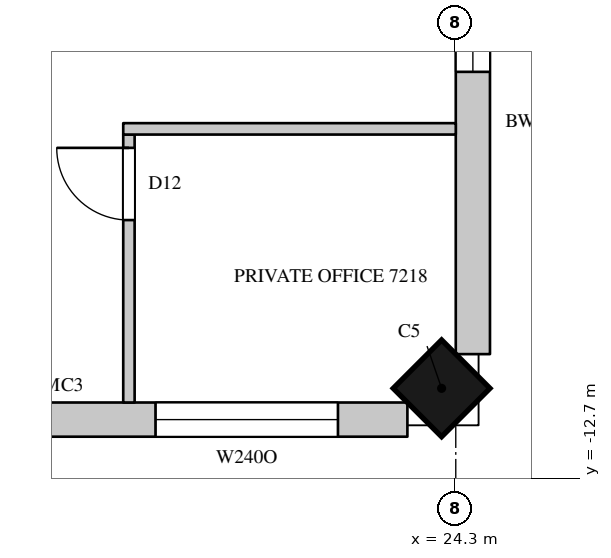
"""IFC4 building model, lengths in metres.
Left out: names, types, materials, properties, quantities, classifications, styles, units other than length and angle.
Written with IfcOpenShell. Run it as: python <this file> out.ifc"""

import sys

from ifc_helpers import new_model, si_unit, direction, frame, frame_2d, origin, origin_2d, place, context, subcontext, project, spatial, rectangle, extrude, element, fill, save


model = new_model("IFC4")
c1 = context("Model", 3, precision=1e-05, world=origin(), true_north=direction((0.0, 1.0)))
c2 = subcontext(c1, "Body", "Model", "MODEL_VIEW")
j1 = project(units=[si_unit("LENGTHUNIT", "METRE"), si_unit("PLANEANGLEUNIT", "RADIAN")], contexts=[c1])
p1 = place(None, origin())
s1 = spatial("IfcSite", under=j1, at=p1, CompositionType="ELEMENT")
p2 = place(p1, origin())
s2 = spatial("IfcBuilding", under=s1, at=p2, CompositionType="ELEMENT")
p3 = place(p2, frame((0.0, 0.0, 317.2)))
s3 = spatial("IfcBuildingStorey", under=s2, at=p3, CompositionType="ELEMENT", Elevation=317.2)
p4 = place(p3, frame((24.114, -11.514, 0.0), z_axis=(0.0, 0.0, 1.0), x_axis=(0.707106781187, 0.707106781187, 0.0)))
e1 = element("IfcColumn", 1, at=p4, inside=s3, PredefinedType="COLUMN", context=c2, shape_type="SweptSolid", body=[
    extrude(rectangle(XDim=0.9, YDim=0.9, at=origin_2d()), origin(), (0.0, 0.0, 1.0), 4.1),
])
p5 = place(p3, frame((18.648, -11.925, 0.0), z_axis=(0.0, 0.0, 1.0), x_axis=(1.0, 0.0, 0.0)))
e2 = element("IfcWall", 2, at=p5, inside=s3, PredefinedType="SOLIDWALL", context=c2, shape_type="SweptSolid", body=[
    extrude(rectangle(XDim=5.015, YDim=0.45, at=frame_2d((2.508, 0.0))), origin(), (0.0, 0.0, 1.0), 3.8),
])
p6 = place(p5, frame((1.702, 0.0, 1.05)))
e3 = element("IfcOpeningElement", 3, at=p6, cuts=e2, PredefinedType="OPENING", context=c2, shape_type="SweptSolid", body=[
    extrude(rectangle(XDim=2.4, YDim=2.4, at=frame_2d((1.2, 1.2))), frame((0.0, 0.235, 0.0), z_axis=(0.0, -1.0, 0.0), x_axis=(1.0, 0.0, 0.0)), (0.0, 0.0, 1.0), 0.47),
])
p7 = place(p3, frame((24.525, -11.064, 0.0), z_axis=(0.0, 0.0, 1.0), x_axis=(0.0, 1.0, 0.0)))
e4 = element("IfcWall", 4, at=p7, inside=s3, PredefinedType="SOLIDWALL", context=c2, shape_type="SweptSolid", body=[
    extrude(rectangle(XDim=6.114, YDim=0.45, at=frame_2d((3.057, 0.0))), origin(), (0.0, 0.0, 1.0), 3.8),
])
p8 = place(p7, frame((3.714, 0.0, 1.05)))
e5 = element("IfcOpeningElement", 5, at=p8, cuts=e4, PredefinedType="OPENING", context=c2, shape_type="SweptSolid", body=[
    extrude(rectangle(XDim=2.1, YDim=2.4, at=frame_2d((1.05, 1.2))), frame((0.0, 0.235, 0.0), z_axis=(0.0, -1.0, 0.0), x_axis=(1.0, 0.0, 0.0)), (0.0, 0.0, 1.0), 0.47),
])
p9 = place(p3, frame((20.0, -11.7, 0.0), z_axis=(0.0, 0.0, 1.0), x_axis=(0.0, 1.0, 0.0)))
e6 = element("IfcWall", 6, at=p9, inside=s3, PredefinedType="PARTITIONING", context=c2, shape_type="SweptSolid", body=[
    extrude(rectangle(XDim=3.525, YDim=0.15, at=frame_2d((1.762, 0.0))), origin(), (0.0, 0.0, 1.0), 3.8),
])
p10 = place(p9, frame((2.4, 0.0, 0.0)))
e7 = element("IfcOpeningElement", 7, at=p10, cuts=e6, PredefinedType="OPENING", context=c2, shape_type="SweptSolid", body=[
    extrude(rectangle(XDim=0.95, YDim=2.2, at=frame_2d((0.475, 1.1))), frame((0.0, 0.085, 0.0), z_axis=(0.0, -1.0, 0.0), x_axis=(1.0, 0.0, 0.0)), (0.0, 0.0, 1.0), 0.17),
])
p11 = place(p3, frame((19.925, -8.1, 0.0), z_axis=(0.0, 0.0, 1.0), x_axis=(1.0, 0.0, 0.0)))
e8 = element("IfcWall", 8, at=p11, inside=s3, PredefinedType="PARTITIONING", context=c2, shape_type="SweptSolid", body=[
    extrude(rectangle(XDim=4.375, YDim=0.15, at=frame_2d((2.188, 0.0))), origin(), (0.0, 0.0, 1.0), 3.15),
])
p12 = place(p8, origin())
e9 = element("IfcWindow", 9, at=p12, inside=s3, PartitioningType="SINGLE_PANEL", PredefinedType="WINDOW", context=c2, shape_type="SweptSolid", body=[
    extrude(rectangle(XDim=2.1, YDim=2.4, at=frame_2d((1.05, 1.2))), frame((0.0, 0.135, 0.0), z_axis=(0.0, -1.0, 0.0), x_axis=(1.0, 0.0, 0.0)), (0.0, 0.0, 1.0), 0.06),
])
fill(e5, e9)
p13 = place(p10, origin())
e10 = element("IfcDoor", 10, at=p13, inside=s3, OperationType="SINGLE_SWING_RIGHT", PredefinedType="DOOR", context=c2, shape_type="SweptSolid", body=[
    extrude(rectangle(XDim=0.95, YDim=2.2, at=frame_2d((0.475, 1.1))), frame((0.0, 0.025, 0.0), z_axis=(0.0, -1.0, 0.0), x_axis=(1.0, 0.0, 0.0)), (0.0, 0.0, 1.0), 0.05),
])
fill(e7, e10)
p14 = place(p6, origin())
e11 = element("IfcWindow", 11, at=p14, inside=s3, PartitioningType="SINGLE_PANEL", PredefinedType="WINDOW", context=c2, shape_type="SweptSolid", body=[
    extrude(rectangle(XDim=2.4, YDim=2.4, at=frame_2d((1.2, 1.2))), frame((0.0, 0.135, 0.0), z_axis=(0.0, -1.0, 0.0), x_axis=(1.0, 0.0, 0.0)), (0.0, 0.0, 1.0), 0.06),
])
fill(e3, e11)
save(model, sys.argv[1])
